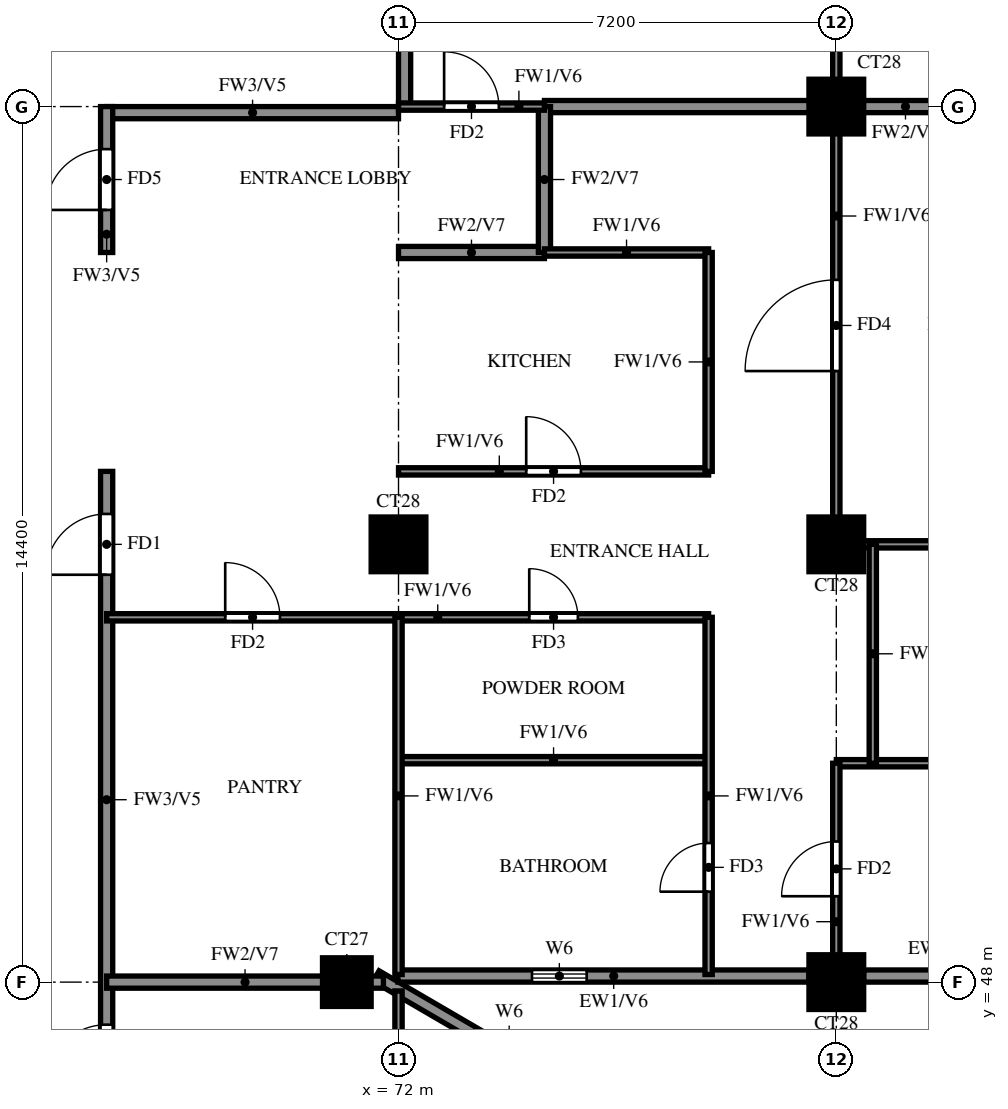
"""IFC4 building model, lengths in metres.
Left out: names, types, materials, properties, quantities, classifications, styles, units other than length and angle.
Written with IfcOpenShell. Run it as: python <this file> out.ifc"""

import sys

from ifc_helpers import new_model, si_unit, direction, frame, frame_2d, origin, origin_2d, place, context, subcontext, project, spatial, rectangle, extrude, source, transform, mapped, element, fill, save


model = new_model("IFC4")
c1 = context("Model", 3, precision=1e-05, world=origin(), true_north=direction((0.0, 1.0)))
c2 = subcontext(c1, "Body", "Model", "MODEL_VIEW")
j1 = project(units=[si_unit("LENGTHUNIT", "METRE"), si_unit("PLANEANGLEUNIT", "RADIAN")], contexts=[c1])
p1 = place(None, origin())
s1 = spatial("IfcSite", under=j1, at=p1, CompositionType="ELEMENT")
p2 = place(p1, origin())
s2 = spatial("IfcBuilding", under=s1, at=p2, CompositionType="ELEMENT")
p3 = place(p2, frame((0.0, 0.0, 202.5)))
s3 = spatial("IfcBuildingStorey", under=s2, at=p3, CompositionType="ELEMENT", Elevation=202.5)
m1 = source(origin(), c2, "Body", "SweptSolid", [
    extrude(rectangle(XDim=0.8, YDim=0.8, at=origin_2d()), origin(), (0.0, 0.0, 1.0), 3.1),
])
p4 = place(p3, frame((71.15, 48.0, 0.0), z_axis=(0.0, 0.0, 1.0), x_axis=(1.0, 0.0, 0.0)))
e1 = element("IfcColumn", 1, at=p4, inside=s3, PredefinedType="COLUMN", context=c2, shape_type="MappedRepresentation", body=[
    mapped(m1, transform((0.0, 0.0, 0.0))),
])
m2 = source(origin(), c2, "Body", "SweptSolid", [
    extrude(rectangle(XDim=0.9, YDim=0.9, at=origin_2d()), origin(), (0.0, 0.0, 1.0), 3.1),
])
for number, where, z_axis, x_axis in (
    (2, (79.2, 48.0, 0.0), (0.0, 0.0, 1.0), (1.0, 0.0, 0.0)),
    (3, (72.0, 55.2, 0.0), (0.0, 0.0, 1.0), (1.0, 0.0, 0.0)),
    (4, (79.2, 55.2, 0.0), (0.0, 0.0, 1.0), (1.0, 0.0, 0.0)),
    (5, (79.2, 62.4, 0.0), (0.0, 0.0, 1.0), (1.0, 0.0, 0.0)),
):
    element("IfcColumn", number, at=place(p3, frame(where, z_axis=z_axis, x_axis=x_axis)), inside=s3, PredefinedType="COLUMN", context=c2, shape_type="MappedRepresentation", body=[
        mapped(m2, transform((0.0, 0.0, 0.0))),
    ])
p5 = place(p3, frame((85.719, 39.881, 0.0), z_axis=(0.0, 0.0, 1.0), x_axis=(-0.86377618652, 0.503875678716, 0.0)))
e6 = element("IfcWall", 6, at=p5, inside=s3, PredefinedType="SOLIDWALL", context=c2, shape_type="SweptSolid", body=[
    extrude(rectangle(XDim=16.311, YDim=0.2, at=frame_2d((8.156, 0.0))), origin(), (0.0, 0.0, 1.0), 3.1),
])
p6 = place(p5, frame((13.326, 0.0, 1.5)))
e7 = element("IfcOpeningElement", 7, at=p6, cuts=e6, PredefinedType="OPENING", context=c2, shape_type="SweptSolid", body=[
    extrude(rectangle(XDim=0.9, YDim=0.9, at=frame_2d((0.45, 0.45))), frame((0.0, 0.11, 0.0), z_axis=(0.0, -1.0, 0.0), x_axis=(1.0, 0.0, 0.0)), (0.0, 0.0, 1.0), 0.22),
])
p7 = place(p3, frame((71.99, 48.1, 0.0), z_axis=(0.0, 0.0, 1.0), x_axis=(1.0, 0.0, 0.0)))
e8 = element("IfcWall", 8, at=p7, inside=s3, PredefinedType="SOLIDWALL", context=c2, shape_type="SweptSolid", body=[
    extrude(rectangle(XDim=6.76, YDim=0.2, at=frame_2d((3.38, 0.0))), origin(), (0.0, 0.0, 1.0), 3.1),
])
p8 = place(p7, frame((2.205, 0.0, 1.5)))
e9 = element("IfcOpeningElement", 9, at=p8, cuts=e8, PredefinedType="OPENING", context=c2, shape_type="SweptSolid", body=[
    extrude(rectangle(XDim=0.9, YDim=0.9, at=frame_2d((0.45, 0.45))), frame((0.0, 0.11, 0.0), z_axis=(0.0, -1.0, 0.0), x_axis=(1.0, 0.0, 0.0)), (0.0, 0.0, 1.0), 0.22),
])
p9 = place(p3, frame((79.65, 48.1, 0.0), z_axis=(0.0, 0.0, 1.0), x_axis=(1.0, 0.0, 0.0)))
e10 = element("IfcWall", 10, at=p9, inside=s3, PredefinedType="SOLIDWALL", context=c2, shape_type="SweptSolid", body=[
    extrude(rectangle(XDim=5.75, YDim=0.2, at=frame_2d((2.875, 0.0))), origin(), (0.0, 0.0, 1.0), 3.1),
])
p10 = place(p9, frame((1.675, 0.0, 0.6)))
e11 = element("IfcOpeningElement", 11, at=p10, cuts=e10, PredefinedType="OPENING", context=c2, shape_type="SweptSolid", body=[
    extrude(rectangle(XDim=2.4, YDim=2.4, at=frame_2d((1.2, 1.2))), frame((0.0, 0.11, 0.0), z_axis=(0.0, -1.0, 0.0), x_axis=(1.0, 0.0, 0.0)), (0.0, 0.0, 1.0), 0.22),
])
p11 = place(p3, frame((67.2, 62.3, 0.0), z_axis=(0.0, 0.0, 1.0), x_axis=(1.0, 0.0, 0.0)))
e12 = element("IfcWall", 12, at=p11, inside=s3, PredefinedType="SOLIDWALL", context=c2, shape_type="SweptSolid", body=[
    extrude(rectangle(XDim=4.8, YDim=0.2, at=frame_2d((2.4, 0.0))), origin(), (0.0, 0.0, 1.0), 3.1),
])
p12 = place(p3, frame((67.2, 45.6, 0.0), z_axis=(0.0, 0.0, 1.0), x_axis=(0.0, 1.0, 0.0)))
e13 = element("IfcWall", 13, at=p12, inside=s3, PredefinedType="SOLIDWALL", context=c2, shape_type="SweptSolid", body=[
    extrude(rectangle(XDim=10.8, YDim=0.2, at=frame_2d((5.4, 0.0))), origin(), (0.0, 0.0, 1.0), 3.1),
])
p13 = place(p12, frame((9.1, 0.0, 0.0)))
e14 = element("IfcOpeningElement", 14, at=p13, cuts=e13, PredefinedType="OPENING", context=c2, shape_type="SweptSolid", body=[
    extrude(rectangle(XDim=1.0, YDim=2.1, at=frame_2d((0.5, 1.05))), frame((0.0, 0.11, 0.0), z_axis=(0.0, -1.0, 0.0), x_axis=(1.0, 0.0, 0.0)), (0.0, 0.0, 1.0), 0.22),
])
p14 = place(p12, frame((0.7, 0.0, 0.0)))
e15 = element("IfcOpeningElement", 15, at=p14, cuts=e13, PredefinedType="OPENING", context=c2, shape_type="SweptSolid", body=[
    extrude(rectangle(XDim=1.0, YDim=2.1, at=frame_2d((0.5, 1.05))), frame((0.0, 0.11, 0.0), z_axis=(0.0, -1.0, 0.0), x_axis=(1.0, 0.0, 0.0)), (0.0, 0.0, 1.0), 0.22),
])
p15 = place(p3, frame((67.2, 60.0, 0.0), z_axis=(0.0, 0.0, 1.0), x_axis=(0.0, 1.0, 0.0)))
e16 = element("IfcWall", 16, at=p15, inside=s3, PredefinedType="SOLIDWALL", context=c2, shape_type="SweptSolid", body=[
    extrude(rectangle(XDim=2.4, YDim=0.2, at=frame_2d((1.2, 0.0))), origin(), (0.0, 0.0, 1.0), 3.1),
])
p16 = place(p15, frame((0.7, 0.0, 0.0)))
e17 = element("IfcOpeningElement", 17, at=p16, cuts=e16, PredefinedType="OPENING", context=c2, shape_type="SweptSolid", body=[
    extrude(rectangle(XDim=1.0, YDim=2.1, at=frame_2d((0.5, 1.05))), frame((0.0, 0.11, 0.0), z_axis=(0.0, -1.0, 0.0), x_axis=(1.0, 0.0, 0.0)), (0.0, 0.0, 1.0), 0.22),
])
p17 = place(p3, frame((72.1, 62.4, 0.0), z_axis=(0.0, 0.0, 1.0), x_axis=(0.0, 1.0, 0.0)))
e18 = element("IfcWall", 18, at=p17, inside=s3, PredefinedType="SOLIDWALL", context=c2, shape_type="SweptSolid", body=[
    extrude(rectangle(XDim=15.6, YDim=0.2, at=frame_2d((7.8, 0.0))), origin(), (0.0, 0.0, 1.0), 3.1),
])
p18 = place(p3, frame((67.2, 48.0, 0.0), z_axis=(0.0, 0.0, 1.0), x_axis=(1.0, 0.0, 0.0)))
e19 = element("IfcWall", 19, at=p18, inside=s3, PredefinedType="SOLIDWALL", context=c2, shape_type="SweptSolid", body=[
    extrude(rectangle(XDim=4.552, YDim=0.2, at=frame_2d((2.276, 0.0))), origin(), (0.0, 0.0, 1.0), 3.1),
])
p19 = place(p3, frame((72.0, 60.0, 0.0), z_axis=(0.0, 0.0, 1.0), x_axis=(1.0, 0.0, 0.0)))
e20 = element("IfcWall", 20, at=p19, inside=s3, PredefinedType="SOLIDWALL", context=c2, shape_type="SweptSolid", body=[
    extrude(rectangle(XDim=2.4, YDim=0.2, at=frame_2d((1.2, 0.0))), origin(), (0.0, 0.0, 1.0), 3.1),
])
p20 = place(p3, frame((74.4, 62.4, 0.0), z_axis=(0.0, 0.0, 1.0), x_axis=(1.0, 0.0, 0.0)))
e21 = element("IfcWall", 21, at=p20, inside=s3, PredefinedType="SOLIDWALL", context=c2, shape_type="SweptSolid", body=[
    extrude(rectangle(XDim=11.875, YDim=0.2, at=frame_2d((5.938, 0.0))), origin(), (0.0, 0.0, 1.0), 3.1),
])
p21 = place(p3, frame((74.4, 60.0, 0.0), z_axis=(0.0, 0.0, 1.0), x_axis=(0.0, 1.0, 0.0)))
e22 = element("IfcWall", 22, at=p21, inside=s3, PredefinedType="SOLIDWALL", context=c2, shape_type="SweptSolid", body=[
    extrude(rectangle(XDim=2.4, YDim=0.2, at=frame_2d((1.2, 0.0))), origin(), (0.0, 0.0, 1.0), 3.1),
])
p22 = place(p3, frame((79.2, 51.6, 0.0), z_axis=(0.0, 0.0, 1.0), x_axis=(1.0, 0.0, 0.0)))
e23 = element("IfcWall", 23, at=p22, inside=s3, PredefinedType="PARTITIONING", context=c2, shape_type="SweptSolid", body=[
    extrude(rectangle(XDim=7.075, YDim=0.12, at=frame_2d((3.538, 0.0))), origin(), (0.0, 0.0, 1.0), 3.1),
])
p23 = place(p22, frame((3.438, 0.0, 0.0)))
e24 = element("IfcOpeningElement", 24, at=p23, cuts=e23, PredefinedType="OPENING", context=c2, shape_type="SweptSolid", body=[
    extrude(rectangle(XDim=0.8, YDim=2.1, at=frame_2d((0.4, 1.05))), frame((0.0, 0.07, 0.0), z_axis=(0.0, -1.0, 0.0), x_axis=(1.0, 0.0, 0.0)), (0.0, 0.0, 1.0), 0.14),
])
p24 = place(p3, frame((72.0, 51.65, 0.0), z_axis=(0.0, 0.0, 1.0), x_axis=(1.0, 0.0, 0.0)))
e25 = element("IfcWall", 25, at=p24, inside=s3, PredefinedType="PARTITIONING", context=c2, shape_type="SweptSolid", body=[
    extrude(rectangle(XDim=5.1, YDim=0.12, at=frame_2d((2.55, 0.0))), origin(), (0.0, 0.0, 1.0), 3.1),
])
p25 = place(p3, frame((67.2, 54.0, 0.0), z_axis=(0.0, 0.0, 1.0), x_axis=(1.0, 0.0, 0.0)))
e26 = element("IfcWall", 26, at=p25, inside=s3, PredefinedType="PARTITIONING", context=c2, shape_type="SweptSolid", body=[
    extrude(rectangle(XDim=9.9, YDim=0.12, at=frame_2d((4.95, 0.0))), origin(), (0.0, 0.0, 1.0), 3.1),
])
p26 = place(p25, frame((6.95, 0.0, 0.0)))
e27 = element("IfcOpeningElement", 27, at=p26, cuts=e26, PredefinedType="OPENING", context=c2, shape_type="SweptSolid", body=[
    extrude(rectangle(XDim=0.8, YDim=2.1, at=frame_2d((0.4, 1.05))), frame((0.0, 0.07, 0.0), z_axis=(0.0, -1.0, 0.0), x_axis=(1.0, 0.0, 0.0)), (0.0, 0.0, 1.0), 0.14),
])
p27 = place(p25, frame((1.95, 0.0, 0.0)))
e28 = element("IfcOpeningElement", 28, at=p27, cuts=e26, PredefinedType="OPENING", context=c2, shape_type="SweptSolid", body=[
    extrude(rectangle(XDim=0.9, YDim=2.1, at=frame_2d((0.45, 1.05))), frame((0.0, 0.07, 0.0), z_axis=(0.0, -1.0, 0.0), x_axis=(1.0, 0.0, 0.0)), (0.0, 0.0, 1.0), 0.14),
])
p28 = place(p3, frame((79.2, 55.2, 0.0), z_axis=(0.0, 0.0, 1.0), x_axis=(1.0, 0.0, 0.0)))
e29 = element("IfcWall", 29, at=p28, inside=s3, PredefinedType="PARTITIONING", context=c2, shape_type="SweptSolid", body=[
    extrude(rectangle(XDim=7.075, YDim=0.12, at=frame_2d((3.538, 0.0))), origin(), (0.0, 0.0, 1.0), 3.1),
])
p29 = place(p3, frame((72.0, 56.4, 0.0), z_axis=(0.0, 0.0, 1.0), x_axis=(1.0, 0.0, 0.0)))
e30 = element("IfcWall", 30, at=p29, inside=s3, PredefinedType="PARTITIONING", context=c2, shape_type="SweptSolid", body=[
    extrude(rectangle(XDim=5.1, YDim=0.12, at=frame_2d((2.55, 0.0))), origin(), (0.0, 0.0, 1.0), 3.1),
])
p30 = place(p29, frame((2.1, 0.0, 0.0)))
e31 = element("IfcOpeningElement", 31, at=p30, cuts=e30, PredefinedType="OPENING", context=c2, shape_type="SweptSolid", body=[
    extrude(rectangle(XDim=0.9, YDim=2.1, at=frame_2d((0.45, 1.05))), frame((0.0, 0.07, 0.0), z_axis=(0.0, -1.0, 0.0), x_axis=(1.0, 0.0, 0.0)), (0.0, 0.0, 1.0), 0.14),
])
p31 = place(p3, frame((74.4, 60.0, 0.0), z_axis=(0.0, 0.0, 1.0), x_axis=(1.0, 0.0, 0.0)))
e32 = element("IfcWall", 32, at=p31, inside=s3, PredefinedType="PARTITIONING", context=c2, shape_type="SweptSolid", body=[
    extrude(rectangle(XDim=2.7, YDim=0.12, at=frame_2d((1.35, 0.0))), origin(), (0.0, 0.0, 1.0), 3.1),
])
p32 = place(p3, frame((72.0, 62.4, 0.0), z_axis=(0.0, 0.0, 1.0), x_axis=(1.0, 0.0, 0.0)))
e33 = element("IfcWall", 33, at=p32, inside=s3, PredefinedType="PARTITIONING", context=c2, shape_type="SweptSolid", body=[
    extrude(rectangle(XDim=2.4, YDim=0.12, at=frame_2d((1.2, 0.0))), origin(), (0.0, 0.0, 1.0), 3.1),
])
p33 = place(p32, frame((0.75, 0.0, 0.0)))
e34 = element("IfcOpeningElement", 34, at=p33, cuts=e33, PredefinedType="OPENING", context=c2, shape_type="SweptSolid", body=[
    extrude(rectangle(XDim=0.9, YDim=2.1, at=frame_2d((0.45, 1.05))), frame((0.0, 0.07, 0.0), z_axis=(0.0, -1.0, 0.0), x_axis=(1.0, 0.0, 0.0)), (0.0, 0.0, 1.0), 0.14),
])
p34 = place(p3, frame((72.0, 39.725, 0.0), z_axis=(0.0, 0.0, 1.0), x_axis=(0.0, 1.0, 0.0)))
e35 = element("IfcWall", 35, at=p34, inside=s3, PredefinedType="PARTITIONING", context=c2, shape_type="SweptSolid", body=[
    extrude(rectangle(XDim=8.13, YDim=0.12, at=frame_2d((4.065, 0.0))), origin(), (0.0, 0.0, 1.0), 3.1),
])
p35 = place(p34, frame((1.788, 0.0, 0.0)))
e36 = element("IfcOpeningElement", 36, at=p35, cuts=e35, PredefinedType="OPENING", context=c2, shape_type="SweptSolid", body=[
    extrude(rectangle(XDim=1.5, YDim=2.1, at=frame_2d((0.75, 1.05))), frame((0.0, 0.07, 0.0), z_axis=(0.0, -1.0, 0.0), x_axis=(1.0, 0.0, 0.0)), (0.0, 0.0, 1.0), 0.14),
])
p36 = place(p34, frame((4.575, 0.0, 0.0)))
e37 = element("IfcOpeningElement", 37, at=p36, cuts=e35, PredefinedType="OPENING", context=c2, shape_type="SweptSolid", body=[
    extrude(rectangle(XDim=0.8, YDim=2.1, at=frame_2d((0.4, 1.05))), frame((0.0, 0.07, 0.0), z_axis=(0.0, -1.0, 0.0), x_axis=(1.0, 0.0, 0.0)), (0.0, 0.0, 1.0), 0.14),
])
p37 = place(p3, frame((72.0, 48.125, 0.0), z_axis=(0.0, 0.0, 1.0), x_axis=(0.0, 1.0, 0.0)))
e38 = element("IfcWall", 38, at=p37, inside=s3, PredefinedType="PARTITIONING", context=c2, shape_type="SweptSolid", body=[
    extrude(rectangle(XDim=5.875, YDim=0.12, at=frame_2d((2.938, 0.0))), origin(), (0.0, 0.0, 1.0), 3.1),
])
p38 = place(p3, frame((77.1, 48.125, 0.0), z_axis=(0.0, 0.0, 1.0), x_axis=(0.0, 1.0, 0.0)))
e39 = element("IfcWall", 39, at=p38, inside=s3, PredefinedType="PARTITIONING", context=c2, shape_type="SweptSolid", body=[
    extrude(rectangle(XDim=5.875, YDim=0.12, at=frame_2d((2.938, 0.0))), origin(), (0.0, 0.0, 1.0), 3.1),
])
p39 = place(p38, frame((1.363, 0.0, 0.0)))
e40 = element("IfcOpeningElement", 40, at=p39, cuts=e39, PredefinedType="OPENING", context=c2, shape_type="SweptSolid", body=[
    extrude(rectangle(XDim=0.8, YDim=2.1, at=frame_2d((0.4, 1.05))), frame((0.0, 0.07, 0.0), z_axis=(0.0, -1.0, 0.0), x_axis=(1.0, 0.0, 0.0)), (0.0, 0.0, 1.0), 0.14),
])
p40 = place(p3, frame((77.1, 56.4, 0.0), z_axis=(0.0, 0.0, 1.0), x_axis=(0.0, 1.0, 0.0)))
e41 = element("IfcWall", 41, at=p40, inside=s3, PredefinedType="PARTITIONING", context=c2, shape_type="SweptSolid", body=[
    extrude(rectangle(XDim=3.6, YDim=0.12, at=frame_2d((1.8, 0.0))), origin(), (0.0, 0.0, 1.0), 3.1),
])
p41 = place(p3, frame((79.2, 48.125, 0.0), z_axis=(0.0, 0.0, 1.0), x_axis=(0.0, 1.0, 0.0)))
e42 = element("IfcWall", 42, at=p41, inside=s3, PredefinedType="PARTITIONING", context=c2, shape_type="SweptSolid", body=[
    extrude(rectangle(XDim=3.475, YDim=0.12, at=frame_2d((1.738, 0.0))), origin(), (0.0, 0.0, 1.0), 3.1),
])
p42 = place(p41, frame((1.288, 0.0, 0.0)))
e43 = element("IfcOpeningElement", 43, at=p42, cuts=e42, PredefinedType="OPENING", context=c2, shape_type="SweptSolid", body=[
    extrude(rectangle(XDim=0.9, YDim=2.1, at=frame_2d((0.45, 1.05))), frame((0.0, 0.07, 0.0), z_axis=(0.0, -1.0, 0.0), x_axis=(1.0, 0.0, 0.0)), (0.0, 0.0, 1.0), 0.14),
])
p43 = place(p3, frame((79.2, 55.2, 0.0), z_axis=(0.0, 0.0, 1.0), x_axis=(0.0, 1.0, 0.0)))
e44 = element("IfcWall", 44, at=p43, inside=s3, PredefinedType="PARTITIONING", context=c2, shape_type="SweptSolid", body=[
    extrude(rectangle(XDim=10.8, YDim=0.12, at=frame_2d((5.4, 0.0))), origin(), (0.0, 0.0, 1.0), 3.1),
])
p44 = place(p43, frame((2.85, 0.0, 0.0)))
e45 = element("IfcOpeningElement", 45, at=p44, cuts=e44, PredefinedType="OPENING", context=c2, shape_type="SweptSolid", body=[
    extrude(rectangle(XDim=1.5, YDim=2.1, at=frame_2d((0.75, 1.05))), frame((0.0, 0.07, 0.0), z_axis=(0.0, -1.0, 0.0), x_axis=(1.0, 0.0, 0.0)), (0.0, 0.0, 1.0), 0.14),
])
p45 = place(p43, frame((8.55, 0.0, 0.0)))
e46 = element("IfcOpeningElement", 46, at=p45, cuts=e44, PredefinedType="OPENING", context=c2, shape_type="SweptSolid", body=[
    extrude(rectangle(XDim=0.9, YDim=2.1, at=frame_2d((0.45, 1.05))), frame((0.0, 0.07, 0.0), z_axis=(0.0, -1.0, 0.0), x_axis=(1.0, 0.0, 0.0)), (0.0, 0.0, 1.0), 0.14),
])
p46 = place(p3, frame((79.8, 51.6, 0.0), z_axis=(0.0, 0.0, 1.0), x_axis=(0.0, 1.0, 0.0)))
e47 = element("IfcWall", 47, at=p46, inside=s3, PredefinedType="PARTITIONING", context=c2, shape_type="SweptSolid", body=[
    extrude(rectangle(XDim=3.6, YDim=0.12, at=frame_2d((1.8, 0.0))), origin(), (0.0, 0.0, 1.0), 3.1),
])
p47 = place(p8, origin())
e48 = element("IfcWindow", 48, at=p47, inside=s3, PartitioningType="SINGLE_PANEL", PredefinedType="WINDOW", context=c2, shape_type="SweptSolid", body=[
    extrude(rectangle(XDim=0.9, YDim=0.9, at=frame_2d((0.45, 0.45))), frame((0.0, 0.03, 0.0), z_axis=(0.0, -1.0, 0.0), x_axis=(1.0, 0.0, 0.0)), (0.0, 0.0, 1.0), 0.06),
])
fill(e9, e48)
p48 = place(p13, origin())
e49 = element("IfcDoor", 49, at=p48, inside=s3, OperationType="SINGLE_SWING_RIGHT", PredefinedType="DOOR", context=c2, shape_type="SweptSolid", body=[
    extrude(rectangle(XDim=1.0, YDim=2.1, at=frame_2d((0.5, 1.05))), frame((0.0, 0.025, 0.0), z_axis=(0.0, -1.0, 0.0), x_axis=(1.0, 0.0, 0.0)), (0.0, 0.0, 1.0), 0.05),
])
fill(e14, e49)
p49 = place(p42, origin())
e50 = element("IfcDoor", 50, at=p49, inside=s3, OperationType="SINGLE_SWING_LEFT", PredefinedType="DOOR", context=c2, shape_type="SweptSolid", body=[
    extrude(rectangle(XDim=0.9, YDim=2.1, at=frame_2d((0.45, 1.05))), frame((0.0, 0.025, 0.0), z_axis=(0.0, -1.0, 0.0), x_axis=(1.0, 0.0, 0.0)), (0.0, 0.0, 1.0), 0.05),
])
fill(e43, e50)
p50 = place(p44, origin())
e51 = element("IfcDoor", 51, at=p50, inside=s3, OperationType="SINGLE_SWING_RIGHT", PredefinedType="DOOR", context=c2, shape_type="SweptSolid", body=[
    extrude(rectangle(XDim=1.5, YDim=2.1, at=frame_2d((0.75, 1.05))), frame((0.0, 0.025, 0.0), z_axis=(0.0, -1.0, 0.0), x_axis=(1.0, 0.0, 0.0)), (0.0, 0.0, 1.0), 0.05),
])
fill(e45, e51)
p51 = place(p39, origin())
e52 = element("IfcDoor", 52, at=p51, inside=s3, OperationType="SINGLE_SWING_LEFT", PredefinedType="DOOR", context=c2, shape_type="SweptSolid", body=[
    extrude(rectangle(XDim=0.8, YDim=2.1, at=frame_2d((0.4, 1.05))), frame((0.0, 0.025, 0.0), z_axis=(0.0, -1.0, 0.0), x_axis=(1.0, 0.0, 0.0)), (0.0, 0.0, 1.0), 0.05),
])
fill(e40, e52)
p52 = place(p26, origin())
e53 = element("IfcDoor", 53, at=p52, inside=s3, OperationType="SINGLE_SWING_LEFT", PredefinedType="DOOR", context=c2, shape_type="SweptSolid", body=[
    extrude(rectangle(XDim=0.8, YDim=2.1, at=frame_2d((0.4, 1.05))), frame((0.0, 0.025, 0.0), z_axis=(0.0, -1.0, 0.0), x_axis=(1.0, 0.0, 0.0)), (0.0, 0.0, 1.0), 0.05),
])
fill(e27, e53)
p53 = place(p30, origin())
e54 = element("IfcDoor", 54, at=p53, inside=s3, OperationType="SINGLE_SWING_RIGHT", PredefinedType="DOOR", context=c2, shape_type="SweptSolid", body=[
    extrude(rectangle(XDim=0.9, YDim=2.1, at=frame_2d((0.45, 1.05))), frame((0.0, 0.025, 0.0), z_axis=(0.0, -1.0, 0.0), x_axis=(1.0, 0.0, 0.0)), (0.0, 0.0, 1.0), 0.05),
])
fill(e31, e54)
p54 = place(p27, origin())
e55 = element("IfcDoor", 55, at=p54, inside=s3, OperationType="SINGLE_SWING_LEFT", PredefinedType="DOOR", context=c2, shape_type="SweptSolid", body=[
    extrude(rectangle(XDim=0.9, YDim=2.1, at=frame_2d((0.45, 1.05))), frame((0.0, 0.025, 0.0), z_axis=(0.0, -1.0, 0.0), x_axis=(1.0, 0.0, 0.0)), (0.0, 0.0, 1.0), 0.05),
])
fill(e28, e55)
p55 = place(p33, origin())
e56 = element("IfcDoor", 56, at=p55, inside=s3, OperationType="SINGLE_SWING_LEFT", PredefinedType="DOOR", context=c2, shape_type="SweptSolid", body=[
    extrude(rectangle(XDim=0.9, YDim=2.1, at=frame_2d((0.45, 1.05))), frame((0.0, 0.025, 0.0), z_axis=(0.0, -1.0, 0.0), x_axis=(1.0, 0.0, 0.0)), (0.0, 0.0, 1.0), 0.05),
])
fill(e34, e56)
p56 = place(p16, origin())
e57 = element("IfcDoor", 57, at=p56, inside=s3, OperationType="SINGLE_SWING_LEFT", PredefinedType="DOOR", context=c2, shape_type="SweptSolid", body=[
    extrude(rectangle(XDim=1.0, YDim=2.1, at=frame_2d((0.5, 1.05))), frame((0.0, 0.025, 0.0), z_axis=(0.0, -1.0, 0.0), x_axis=(1.0, 0.0, 0.0)), (0.0, 0.0, 1.0), 0.05),
])
fill(e17, e57)
p57 = place(p14, origin())
e58 = element("IfcDoor", 58, at=p57, inside=s3, OperationType="SINGLE_SWING_LEFT", PredefinedType="DOOR", context=c2, shape_type="SweptSolid", body=[
    extrude(rectangle(XDim=1.0, YDim=2.1, at=frame_2d((0.5, 1.05))), frame((0.0, 0.025, 0.0), z_axis=(0.0, -1.0, 0.0), x_axis=(1.0, 0.0, 0.0)), (0.0, 0.0, 1.0), 0.05),
])
fill(e15, e58)
save(model, sys.argv[1])
